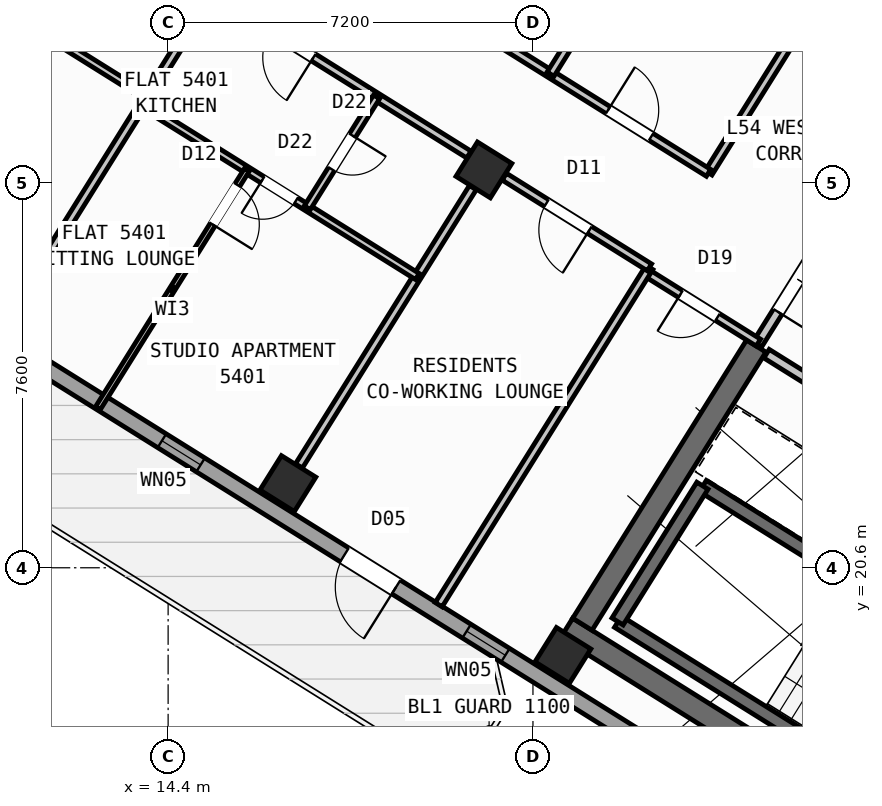
"""IFC4 building model, lengths in metres.
Left out: names, types, materials, properties, quantities, classifications, styles, units other than length and angle.
Written with IfcOpenShell. Run it as: python <this file> out.ifc"""

import sys

from ifc_helpers import new_model, si_unit, direction, frame, frame_2d, origin, origin_2d, place, context, subcontext, project, spatial, rectangle, hollow_rectangle, extrude, source, transform, mapped, element, fill, save


model = new_model("IFC4")
c1 = context("Model", 3, precision=1e-05, world=origin(), true_north=direction((0.0, 1.0)))
c2 = subcontext(c1, "Body", "Model", "MODEL_VIEW")
j1 = project(units=[si_unit("LENGTHUNIT", "METRE"), si_unit("PLANEANGLEUNIT", "RADIAN")], contexts=[c1])
p1 = place(None, origin())
s1 = spatial("IfcSite", under=j1, at=p1, CompositionType="ELEMENT")
p2 = place(p1, origin())
s2 = spatial("IfcBuilding", under=s1, at=p2, CompositionType="ELEMENT")
p3 = place(p2, frame((0.0, 0.0, 214.8)))
s3 = spatial("IfcBuildingStorey", under=s2, at=p3, CompositionType="ELEMENT", Elevation=214.8)
p4 = place(p3, frame((33.324, 12.503, 0.0), z_axis=(0.0, 0.0, 1.0), x_axis=(-0.848043529849, 0.529926571782, 0.0)))
e1 = element("IfcWall", 1, at=p4, inside=s3, PredefinedType="SHEAR", context=c2, shape_type="SweptSolid", body=[
    extrude(rectangle(XDim=13.04, YDim=0.45, at=frame_2d((6.52, 0.0))), origin(), (0.0, 0.0, 1.0), 3.35),
])
p5 = place(p3, frame((26.007, 24.976, 0.0), z_axis=(0.0, 0.0, 1.0), x_axis=(-0.529931155655, -0.848040665456, 0.0)))
e2 = element("IfcWall", 2, at=p5, inside=s3, PredefinedType="SHEAR", context=c2, shape_type="SweptSolid", body=[
    extrude(rectangle(XDim=6.475, YDim=0.45, at=frame_2d((3.238, 0.0))), origin(), (0.0, 0.0, 1.0), 3.35),
])
m1 = source(origin(), c2, "Body", "SweptSolid", [
    extrude(hollow_rectangle(XDim=0.8, YDim=0.8, WallThickness=0.032, at=origin_2d()), origin(), (0.0, 0.0, 1.0), 3.6),
])
for number, where, z_axis, x_axis in (
    (3, (22.191, 18.87, 0.0), (0.0, 0.0, 1.0), (-0.848, 0.53, 0.0)),
    (4, (20.632, 28.452, 0.0), (0.0, 0.0, 1.0), (-0.848, 0.53, 0.0)),
    (5, (16.764, 22.261, 0.0), (0.0, 0.0, 1.0), (-0.848, 0.53, 0.0)),
):
    element("IfcColumn", number, at=place(p3, frame(where, z_axis=z_axis, x_axis=x_axis)), inside=s3, PredefinedType="COLUMN", context=c2, shape_type="MappedRepresentation", body=[
        mapped(m1, transform((0.0, 0.0, 0.0), scale=1.0)),
    ])
p6 = place(p3, frame((31.76, 12.183, 0.0), z_axis=(0.0, 0.0, 1.0), x_axis=(-0.848047074256, 0.529920899612, 0.0)))
e6 = element("IfcWall", 6, at=p6, inside=s3, PredefinedType="STANDARD", context=c2, shape_type="SweptSolid", body=[
    extrude(rectangle(XDim=30.652, YDim=0.32, at=frame_2d((15.326, 0.0))), origin(), (0.0, 0.0, 1.0), 3.35),
])
p7 = place(p6, frame((15.166, 0.0, 0.0)))
e7 = element("IfcOpeningElement", 7, at=p7, cuts=e6, PredefinedType="OPENING", context=c2, shape_type="SweptSolid", body=[
    extrude(rectangle(XDim=1.2, YDim=2.15, at=frame_2d((0.6, 1.075))), frame((0.0, 0.17, 0.0), z_axis=(0.0, -1.0, 0.0), x_axis=(1.0, 0.0, 0.0)), (0.0, 0.0, 1.0), 0.34),
])
p8 = place(p6, frame((2.24, 0.0, 0.9)))
e8 = element("IfcOpeningElement", 8, at=p8, cuts=e6, PredefinedType="OPENING", context=c2, shape_type="SweptSolid", body=[
    extrude(rectangle(XDim=1.65, YDim=1.45, at=frame_2d((0.825, 0.725))), frame((0.0, 0.17, 0.0), z_axis=(0.0, -1.0, 0.0), x_axis=(1.0, 0.0, 0.0)), (0.0, 0.0, 1.0), 0.34),
])
p9 = place(p6, frame((7.469, 0.0, 0.9)))
e9 = element("IfcOpeningElement", 9, at=p9, cuts=e6, PredefinedType="OPENING", context=c2, shape_type="SweptSolid", body=[
    extrude(rectangle(XDim=1.65, YDim=1.45, at=frame_2d((0.825, 0.725))), frame((0.0, 0.17, 0.0), z_axis=(0.0, -1.0, 0.0), x_axis=(1.0, 0.0, 0.0)), (0.0, 0.0, 1.0), 0.34),
])
p10 = place(p6, frame((12.623, 0.0, 1.0)))
e10 = element("IfcOpeningElement", 10, at=p10, cuts=e6, PredefinedType="OPENING", context=c2, shape_type="SweptSolid", body=[
    extrude(rectangle(XDim=0.9, YDim=1.25, at=frame_2d((0.45, 0.625))), frame((0.0, 0.17, 0.0), z_axis=(0.0, -1.0, 0.0), x_axis=(1.0, 0.0, 0.0)), (0.0, 0.0, 1.0), 0.34),
])
p11 = place(p6, frame((19.715, 0.0, 1.0)))
e11 = element("IfcOpeningElement", 11, at=p11, cuts=e6, PredefinedType="OPENING", context=c2, shape_type="SweptSolid", body=[
    extrude(rectangle(XDim=0.9, YDim=1.25, at=frame_2d((0.45, 0.625))), frame((0.0, 0.17, 0.0), z_axis=(0.0, -1.0, 0.0), x_axis=(1.0, 0.0, 0.0)), (0.0, 0.0, 1.0), 0.34),
])
p12 = place(p6, frame((25.566, 0.0, 0.9)))
e12 = element("IfcOpeningElement", 12, at=p12, cuts=e6, PredefinedType="OPENING", context=c2, shape_type="SweptSolid", body=[
    extrude(rectangle(XDim=1.65, YDim=1.45, at=frame_2d((0.825, 0.725))), frame((0.0, 0.17, 0.0), z_axis=(0.0, -1.0, 0.0), x_axis=(1.0, 0.0, 0.0)), (0.0, 0.0, 1.0), 0.34),
])
p13 = place(p6, frame((28.896, 0.0, 1.0)))
e13 = element("IfcOpeningElement", 13, at=p13, cuts=e6, PredefinedType="OPENING", context=c2, shape_type="SweptSolid", body=[
    extrude(rectangle(XDim=0.9, YDim=1.25, at=frame_2d((0.45, 0.625))), frame((0.0, 0.17, 0.0), z_axis=(0.0, -1.0, 0.0), x_axis=(1.0, 0.0, 0.0)), (0.0, 0.0, 1.0), 0.34),
])
p14 = place(p3, frame((5.7, 28.71, 0.0), z_axis=(0.0, 0.0, 1.0), x_axis=(0.529923711467, 0.8480453172, 0.0)))
e14 = element("IfcWall", 14, at=p14, inside=s3, PredefinedType="STANDARD", context=c2, shape_type="SweptSolid", body=[
    extrude(rectangle(XDim=21.587, YDim=0.32, at=frame_2d((10.794, 0.0))), origin(), (0.0, 0.0, 1.0), 2.825),
])
p15 = place(p14, frame((2.184, 0.0, 0.9)))
e15 = element("IfcOpeningElement", 15, at=p15, cuts=e14, PredefinedType="OPENING", context=c2, shape_type="SweptSolid", body=[
    extrude(rectangle(XDim=1.65, YDim=1.45, at=frame_2d((0.825, 0.725))), frame((0.0, 0.17, 0.0), z_axis=(0.0, -1.0, 0.0), x_axis=(1.0, 0.0, 0.0)), (0.0, 0.0, 1.0), 0.34),
])
p16 = place(p14, frame((11.709, 0.0, 0.9)))
e16 = element("IfcOpeningElement", 16, at=p16, cuts=e14, PredefinedType="OPENING", context=c2, shape_type="SweptSolid", body=[
    extrude(rectangle(XDim=1.35, YDim=1.45, at=frame_2d((0.675, 0.725))), frame((0.0, 0.17, 0.0), z_axis=(0.0, -1.0, 0.0), x_axis=(1.0, 0.0, 0.0)), (0.0, 0.0, 1.0), 0.34),
])
p17 = place(p14, frame((17.181, 0.0, 0.95)))
e17 = element("IfcOpeningElement", 17, at=p17, cuts=e14, PredefinedType="OPENING", context=c2, shape_type="SweptSolid", body=[
    extrude(rectangle(XDim=1.95, YDim=1.35, at=frame_2d((0.975, 0.675))), frame((0.0, 0.17, 0.0), z_axis=(0.0, -1.0, 0.0), x_axis=(1.0, 0.0, 0.0)), (0.0, 0.0, 1.0), 0.34),
])
p18 = place(p3, frame((29.605, 15.581, 0.0), z_axis=(0.0, 0.0, 1.0), x_axis=(-0.848036911448, 0.529937163087, 0.0)))
e18 = element("IfcWall", 18, at=p18, inside=s3, PredefinedType="SHEAR", context=c2, shape_type="SweptSolid", body=[
    extrude(rectangle(XDim=7.46, YDim=0.26, at=frame_2d((3.73, 0.0))), origin(), (0.0, 0.0, 1.0), 3.35),
])
p19 = place(p3, frame((31.28, 18.261, 0.0), z_axis=(0.0, 0.0, 1.0), x_axis=(-0.848051618787, 0.529913626805, 0.0)))
e19 = element("IfcWall", 19, at=p19, inside=s3, PredefinedType="SHEAR", context=c2, shape_type="SweptSolid", body=[
    extrude(rectangle(XDim=7.46, YDim=0.26, at=frame_2d((3.73, 0.0))), origin(), (0.0, 0.0, 1.0), 3.35),
])
p20 = place(p19, frame((0.36, 0.0, 0.0)))
e20 = element("IfcOpeningElement", 20, at=p20, cuts=e19, PredefinedType="OPENING", context=c2, shape_type="SweptSolid", body=[
    extrude(rectangle(XDim=0.86, YDim=2.05, at=frame_2d((0.43, 1.025))), frame((0.0, 0.14, 0.0), z_axis=(0.0, -1.0, 0.0), x_axis=(1.0, 0.0, 0.0)), (0.0, 0.0, 1.0), 0.28),
])
p21 = place(p3, frame((24.945, 22.22, 0.0), z_axis=(0.0, 0.0, 1.0), x_axis=(-0.529908658664, -0.84805472316, 0.0)))
e21 = element("IfcWall", 21, at=p21, inside=s3, PredefinedType="SHEAR", context=c2, shape_type="SweptSolid", body=[
    extrude(rectangle(XDim=3.16, YDim=0.26, at=frame_2d((1.58, 0.0))), origin(), (0.0, 0.0, 1.0), 3.35),
])
p22 = place(p3, frame((31.525, 21.504, 0.0), z_axis=(0.0, 0.0, 1.0), x_axis=(-0.848042066329, 0.529928913853, 0.0)))
e22 = element("IfcWall", 22, at=p22, inside=s3, PredefinedType="STANDARD", context=c2, shape_type="SweptSolid", body=[
    extrude(rectangle(XDim=6.268, YDim=0.2, at=frame_2d((3.134, 0.0))), origin(), (0.0, 0.0, 1.0), 3.34),
])
p23 = place(p22, frame((4.4, 0.0, 0.0)))
e23 = element("IfcOpeningElement", 23, at=p23, cuts=e22, PredefinedType="OPENING", context=c2, shape_type="SweptSolid", body=[
    extrude(rectangle(XDim=0.86, YDim=2.05, at=frame_2d((0.43, 1.025))), frame((0.0, 0.11, 0.0), z_axis=(0.0, -1.0, 0.0), x_axis=(1.0, 0.0, 0.0)), (0.0, 0.0, 1.0), 0.22),
])
p24 = place(p22, frame((1.45, 0.0, 0.0)))
e24 = element("IfcOpeningElement", 24, at=p24, cuts=e22, PredefinedType="OPENING", context=c2, shape_type="SweptSolid", body=[
    extrude(rectangle(XDim=0.86, YDim=2.05, at=frame_2d((0.43, 1.025))), frame((0.0, 0.11, 0.0), z_axis=(0.0, -1.0, 0.0), x_axis=(1.0, 0.0, 0.0)), (0.0, 0.0, 1.0), 0.22),
])
p25 = place(p3, frame((27.596, 27.52, 0.0), z_axis=(0.0, 0.0, 1.0), x_axis=(-0.529865479138, -0.848081702443, 0.0)))
e25 = element("IfcWall", 25, at=p25, inside=s3, PredefinedType="STANDARD", context=c2, shape_type="SweptSolid", body=[
    extrude(rectangle(XDim=2.96, YDim=0.2, at=frame_2d((1.48, 0.0))), origin(), (0.0, 0.0, 1.0), 3.34),
])
p26 = place(p25, frame((0.7, 0.0, 0.0)))
e26 = element("IfcOpeningElement", 26, at=p26, cuts=e25, PredefinedType="OPENING", context=c2, shape_type="SweptSolid", body=[
    extrude(rectangle(XDim=1.5, YDim=2.15, at=frame_2d((0.75, 1.075))), frame((0.0, 0.11, 0.0), z_axis=(0.0, -1.0, 0.0), x_axis=(1.0, 0.0, 0.0)), (0.0, 0.0, 1.0), 0.22),
])
p27 = place(p3, frame((26.049, 25.044, 0.0), z_axis=(0.0, 0.0, 1.0), x_axis=(-0.848050851465, 0.529914854792, 0.0)))
e27 = element("IfcWall", 27, at=p27, inside=s3, PredefinedType="PARTITIONING", context=c2, shape_type="SweptSolid", body=[
    extrude(rectangle(XDim=2.61, YDim=0.16, at=frame_2d((1.305, 0.0))), origin(), (0.0, 0.0, 1.0), 2.825),
])
p28 = place(p27, frame((0.95, 0.0, 0.0)))
e28 = element("IfcOpeningElement", 28, at=p28, cuts=e27, PredefinedType="OPENING", context=c2, shape_type="SweptSolid", body=[
    extrude(rectangle(XDim=0.86, YDim=2.05, at=frame_2d((0.43, 1.025))), frame((0.0, 0.09, 0.0), z_axis=(0.0, -1.0, 0.0), x_axis=(1.0, 0.0, 0.0)), (0.0, 0.0, 1.0), 0.18),
])
p29 = place(p3, frame((31.239, 38.274, 0.0), z_axis=(0.0, 0.0, 1.0), x_axis=(-0.529925472745, -0.848044216616, 0.0)))
e29 = element("IfcWall", 29, at=p29, inside=s3, PredefinedType="PARTITIONING", context=c2, shape_type="SweptSolid", body=[
    extrude(rectangle(XDim=11.65, YDim=0.16, at=frame_2d((5.825, 0.0))), origin(), (0.0, 0.0, 1.0), 3.34),
])
p30 = place(p3, frame((23.899, 26.529, 0.0), z_axis=(0.0, 0.0, 1.0), x_axis=(-0.529920662441, -0.848047222457, 0.0)))
e30 = element("IfcWall", 30, at=p30, inside=s3, PredefinedType="PARTITIONING", context=c2, shape_type="SweptSolid", body=[
    extrude(rectangle(XDim=7.85, YDim=0.16, at=frame_2d((3.925, 0.0))), origin(), (0.0, 0.0, 1.0), 3.34),
])
p31 = place(p3, frame((25.065, 28.394, 0.0), z_axis=(0.0, 0.0, 1.0), x_axis=(-0.848048310262, 0.529918921593, 0.0)))
e31 = element("IfcWall", 31, at=p31, inside=s3, PredefinedType="PARTITIONING", context=c2, shape_type="SweptSolid", body=[
    extrude(rectangle(XDim=16.73, YDim=0.16, at=frame_2d((8.365, 0.0))), origin(), (0.0, 0.0, 1.0), 3.34),
])
p32 = place(p31, frame((1.338, 0.0, 0.0)))
e32 = element("IfcOpeningElement", 32, at=p32, cuts=e31, PredefinedType="OPENING", context=c2, shape_type="SweptSolid", body=[
    extrude(rectangle(XDim=1.0, YDim=2.1, at=frame_2d((0.5, 1.05))), frame((0.0, 0.09, 0.0), z_axis=(0.0, -1.0, 0.0), x_axis=(1.0, 0.0, 0.0)), (0.0, 0.0, 1.0), 0.18),
])
p33 = place(p31, frame((5.265, 0.0, 0.0)))
e33 = element("IfcOpeningElement", 33, at=p33, cuts=e31, PredefinedType="OPENING", context=c2, shape_type="SweptSolid", body=[
    extrude(rectangle(XDim=1.0, YDim=2.1, at=frame_2d((0.5, 1.05))), frame((0.0, 0.09, 0.0), z_axis=(0.0, -1.0, 0.0), x_axis=(1.0, 0.0, 0.0)), (0.0, 0.0, 1.0), 0.18),
])
p34 = place(p31, frame((9.526, 0.0, 0.0)))
e34 = element("IfcOpeningElement", 34, at=p34, cuts=e31, PredefinedType="OPENING", context=c2, shape_type="SweptSolid", body=[
    extrude(rectangle(XDim=1.0, YDim=2.1, at=frame_2d((0.5, 1.05))), frame((0.0, 0.09, 0.0), z_axis=(0.0, -1.0, 0.0), x_axis=(1.0, 0.0, 0.0)), (0.0, 0.0, 1.0), 0.18),
])
p35 = place(p31, frame((13.954, 0.0, 0.0)))
e35 = element("IfcOpeningElement", 35, at=p35, cuts=e31, PredefinedType="OPENING", context=c2, shape_type="SweptSolid", body=[
    extrude(rectangle(XDim=1.0, YDim=2.1, at=frame_2d((0.5, 1.05))), frame((0.0, 0.09, 0.0), z_axis=(0.0, -1.0, 0.0), x_axis=(1.0, 0.0, 0.0)), (0.0, 0.0, 1.0), 0.18),
])
p36 = place(p3, frame((23.899, 26.529, 0.0), z_axis=(0.0, 0.0, 1.0), x_axis=(-0.848055143312, 0.529907986259, 0.0)))
e36 = element("IfcWall", 36, at=p36, inside=s3, PredefinedType="PARTITIONING", context=c2, shape_type="SweptSolid", body=[
    extrude(rectangle(XDim=3.378, YDim=0.16, at=frame_2d((1.689, 0.0))), origin(), (0.0, 0.0, 1.0), 2.825),
])
p37 = place(p36, frame((1.395, 0.0, 0.0)))
e37 = element("IfcOpeningElement", 37, at=p37, cuts=e36, PredefinedType="OPENING", context=c2, shape_type="SweptSolid", body=[
    extrude(rectangle(XDim=1.0, YDim=2.1, at=frame_2d((0.5, 1.05))), frame((0.0, 0.09, 0.0), z_axis=(0.0, -1.0, 0.0), x_axis=(1.0, 0.0, 0.0)), (0.0, 0.0, 1.0), 0.18),
])
p38 = place(p3, frame((20.336, 28.755, 0.0), z_axis=(0.0, 0.0, 1.0), x_axis=(-0.848049955116, 0.529916289265, 0.0)))
e38 = element("IfcWall", 38, at=p38, inside=s3, PredefinedType="PARTITIONING", context=c2, shape_type="SweptSolid", body=[
    extrude(rectangle(XDim=5.576, YDim=0.16, at=frame_2d((2.788, 0.0))), origin(), (0.0, 0.0, 1.0), 2.825),
])
p39 = place(p38, frame((3.618, 0.0, 0.0)))
e39 = element("IfcOpeningElement", 39, at=p39, cuts=e38, PredefinedType="OPENING", context=c2, shape_type="SweptSolid", body=[
    extrude(rectangle(XDim=1.0, YDim=2.1, at=frame_2d((0.5, 1.05))), frame((0.0, 0.09, 0.0), z_axis=(0.0, -1.0, 0.0), x_axis=(1.0, 0.0, 0.0)), (0.0, 0.0, 1.0), 0.18),
])
p40 = place(p3, frame((20.414, 28.103, 0.0), z_axis=(0.0, 0.0, 1.0), x_axis=(-0.529934553702, -0.848038542045, 0.0)))
e40 = element("IfcWall", 40, at=p40, inside=s3, PredefinedType="PARTITIONING", context=c2, shape_type="SweptSolid", body=[
    extrude(rectangle(XDim=6.476, YDim=0.16, at=frame_2d((3.238, 0.0))), origin(), (0.0, 0.0, 1.0), 2.825),
])
p41 = place(p3, frame((14.986, 31.494, 0.0), z_axis=(0.0, 0.0, 1.0), x_axis=(-0.529907440938, -0.848055484057, 0.0)))
e41 = element("IfcWall", 41, at=p41, inside=s3, PredefinedType="PARTITIONING", context=c2, shape_type="SweptSolid", body=[
    extrude(rectangle(XDim=6.476, YDim=0.16, at=frame_2d((3.238, 0.0))), origin(), (0.0, 0.0, 1.0), 2.825),
])
p42 = place(p3, frame((19.318, 26.349, 0.0), z_axis=(0.0, 0.0, 1.0), x_axis=(-0.848039019877, 0.529933789039, 0.0)))
e42 = element("IfcWall", 42, at=p42, inside=s3, PredefinedType="PLUMBINGWALL", context=c2, shape_type="SweptSolid", body=[
    extrude(rectangle(XDim=6.4, YDim=0.14, at=frame_2d((3.2, 0.0))), origin(), (0.0, 0.0, 1.0), 3.34),
])
p43 = place(p42, frame((2.824, 0.0, 0.0)))
e43 = element("IfcOpeningElement", 43, at=p43, cuts=e42, PredefinedType="OPENING", context=c2, shape_type="SweptSolid", body=[
    extrude(rectangle(XDim=0.78, YDim=2.05, at=frame_2d((0.39, 1.025))), frame((0.0, 0.08, 0.0), z_axis=(0.0, -1.0, 0.0), x_axis=(1.0, 0.0, 0.0)), (0.0, 0.0, 1.0), 0.16),
])
p44 = place(p3, frame((18.514, 29.894, 0.0), z_axis=(0.0, 0.0, 1.0), x_axis=(-0.529913878929, -0.848051461244, 0.0)))
e44 = element("IfcWall", 44, at=p44, inside=s3, PredefinedType="PLUMBINGWALL", context=c2, shape_type="SweptSolid", body=[
    extrude(rectangle(XDim=2.58, YDim=0.14, at=frame_2d((1.29, 0.0))), origin(), (0.0, 0.0, 1.0), 3.34),
])
p45 = place(p44, frame((0.9, 0.0, 0.0)))
e45 = element("IfcOpeningElement", 45, at=p45, cuts=e44, PredefinedType="OPENING", context=c2, shape_type="SweptSolid", body=[
    extrude(rectangle(XDim=0.78, YDim=2.05, at=frame_2d((0.39, 1.025))), frame((0.0, 0.08, 0.0), z_axis=(0.0, -1.0, 0.0), x_axis=(1.0, 0.0, 0.0)), (0.0, 0.0, 1.0), 0.16),
])
p46 = place(p3, frame((15.953, 28.452, 0.0), z_axis=(0.0, 0.0, 1.0), x_axis=(-0.529919714018, -0.848047815099, 0.0)))
e46 = element("IfcWall", 46, at=p46, inside=s3, PredefinedType="PARTITIONING", context=c2, shape_type="SweptSolid", body=[
    extrude(rectangle(XDim=5.54, YDim=0.11, at=frame_2d((2.77, 0.0))), origin(), (0.0, 0.0, 1.0), 3.34),
])
p47 = place(p46, frame((0.35, 0.0, 0.0)))
e47 = element("IfcOpeningElement", 47, at=p47, cuts=e46, PredefinedType="OPENING", context=c2, shape_type="SweptSolid", body=[
    extrude(rectangle(XDim=0.92, YDim=2.08, at=frame_2d((0.46, 1.04))), frame((0.0, 0.065, 0.0), z_axis=(0.0, -1.0, 0.0), x_axis=(1.0, 0.0, 0.0)), (0.0, 0.0, 1.0), 0.13),
])
p48 = place(p3, frame((12.188, 33.847, 0.0), z_axis=(0.0, 0.0, 1.0), x_axis=(-0.529917860021, -0.848048973604, 0.0)))
e48 = element("IfcWall", 48, at=p48, inside=s3, PredefinedType="PARTITIONING", context=c2, shape_type="SweptSolid", body=[
    extrude(rectangle(XDim=8.12, YDim=0.11, at=frame_2d((4.06, 0.0))), origin(), (0.0, 0.0, 1.0), 3.34),
])
p49 = place(p48, frame((0.76, 0.0, 0.0)))
e49 = element("IfcOpeningElement", 49, at=p49, cuts=e48, PredefinedType="OPENING", context=c2, shape_type="SweptSolid", body=[
    extrude(rectangle(XDim=0.78, YDim=2.05, at=frame_2d((0.39, 1.025))), frame((0.0, 0.065, 0.0), z_axis=(0.0, -1.0, 0.0), x_axis=(1.0, 0.0, 0.0)), (0.0, 0.0, 1.0), 0.13),
])
p50 = place(p48, frame((4.8, 0.0, 0.0)))
e50 = element("IfcOpeningElement", 50, at=p50, cuts=e48, PredefinedType="OPENING", context=c2, shape_type="SweptSolid", body=[
    extrude(rectangle(XDim=0.92, YDim=2.08, at=frame_2d((0.46, 1.04))), frame((0.0, 0.065, 0.0), z_axis=(0.0, -1.0, 0.0), x_axis=(1.0, 0.0, 0.0)), (0.0, 0.0, 1.0), 0.13),
])
p51 = place(p3, frame((13.986, 29.893, 0.0), z_axis=(0.0, 0.0, 1.0), x_axis=(-0.848051346257, 0.52991406295, 0.0)))
e51 = element("IfcWall", 51, at=p51, inside=s3, PredefinedType="PLUMBINGWALL", context=c2, shape_type="SweptSolid", body=[
    extrude(rectangle(XDim=3.62, YDim=0.14, at=frame_2d((1.81, 0.0))), origin(), (0.0, 0.0, 1.0), 3.34),
])
p52 = place(p3, frame((24.379, 34.233, 0.0), z_axis=(0.0, 0.0, 1.0), x_axis=(-0.529922402838, -0.84804613493, 0.0)))
e52 = element("IfcWall", 52, at=p52, inside=s3, PredefinedType="PARTITIONING", context=c2, shape_type="SweptSolid", body=[
    extrude(rectangle(XDim=4.588, YDim=0.16, at=frame_2d((2.294, 0.0))), origin(), (0.0, 0.0, 1.0), 2.825),
])
m2 = source(origin(), c2, "Body", "SweptSolid", [
    extrude(rectangle(XDim=1.2, YDim=2.15, at=frame_2d((0.6, 1.075))), frame((0.0, 0.025, 0.0), z_axis=(0.0, -1.0, 0.0), x_axis=(1.0, 0.0, 0.0)), (0.0, 0.0, 1.0), 0.05),
])
p53 = place(p7, origin())
e53 = element("IfcDoor", 53, at=p53, inside=s3, OperationType="SINGLE_SWING_LEFT", PredefinedType="DOOR", context=c2, shape_type="MappedRepresentation", body=[
    mapped(m2, transform((0.0, 0.0, 0.0), scale=1.0)),
])
fill(e7, e53)
m3 = source(origin(), c2, "Body", "SweptSolid", [
    extrude(rectangle(XDim=0.9, YDim=1.25, at=frame_2d((0.45, 0.625))), frame((0.0, 0.03, 0.0), z_axis=(0.0, -1.0, 0.0), x_axis=(1.0, 0.0, 0.0)), (0.0, 0.0, 1.0), 0.06),
])
p54 = place(p10, origin())
e54 = element("IfcWindow", 54, at=p54, inside=s3, PartitioningType="SINGLE_PANEL", PredefinedType="WINDOW", context=c2, shape_type="MappedRepresentation", body=[
    mapped(m3, transform((0.0, 0.0, 0.0), scale=1.0)),
])
fill(e10, e54)
p55 = place(p11, origin())
e55 = element("IfcWindow", 55, at=p55, inside=s3, PartitioningType="SINGLE_PANEL", PredefinedType="WINDOW", context=c2, shape_type="MappedRepresentation", body=[
    mapped(m3, transform((0.0, 0.0, 0.0), scale=1.0)),
])
fill(e11, e55)
m4 = source(origin(), c2, "Body", "SweptSolid", [
    extrude(rectangle(XDim=0.86, YDim=2.05, at=frame_2d((0.43, 1.025))), frame((0.0, 0.025, 0.0), z_axis=(0.0, -1.0, 0.0), x_axis=(1.0, 0.0, 0.0)), (0.0, 0.0, 1.0), 0.05),
])
p56 = place(p28, origin())
e56 = element("IfcDoor", 56, at=p56, inside=s3, OperationType="SINGLE_SWING_RIGHT", PredefinedType="DOOR", context=c2, shape_type="MappedRepresentation", body=[
    mapped(m4, transform((0.0, 0.0, 0.0), scale=1.0)),
])
fill(e28, e56)
m5 = source(origin(), c2, "Body", "SweptSolid", [
    extrude(rectangle(XDim=1.5, YDim=2.15, at=frame_2d((0.75, 1.075))), frame((0.0, 0.025, 0.0), z_axis=(0.0, -1.0, 0.0), x_axis=(1.0, 0.0, 0.0)), (0.0, 0.0, 1.0), 0.05),
])
p57 = place(p26, origin())
e57 = element("IfcDoor", 57, at=p57, inside=s3, OperationType="DOUBLE_DOOR_SINGLE_SWING", PredefinedType="DOOR", context=c2, shape_type="MappedRepresentation", body=[
    mapped(m5, transform((0.0, 0.0, 0.0), scale=1.0)),
])
fill(e26, e57)
m6 = source(origin(), c2, "Body", "SweptSolid", [
    extrude(rectangle(XDim=1.0, YDim=2.1, at=frame_2d((0.5, 1.05))), frame((0.0, 0.025, 0.0), z_axis=(0.0, -1.0, 0.0), x_axis=(1.0, 0.0, 0.0)), (0.0, 0.0, 1.0), 0.05),
])
p58 = place(p37, origin())
e58 = element("IfcDoor", 58, at=p58, inside=s3, OperationType="SINGLE_SWING_LEFT", PredefinedType="DOOR", context=c2, shape_type="MappedRepresentation", body=[
    mapped(m6, transform((0.0, 0.0, 0.0), scale=1.0)),
])
fill(e37, e58)
m7 = source(origin(), c2, "Body", "SweptSolid", [
    extrude(rectangle(XDim=0.92, YDim=2.08, at=frame_2d((0.46, 1.04))), frame((0.0, 0.025, 0.0), z_axis=(0.0, -1.0, 0.0), x_axis=(1.0, 0.0, 0.0)), (0.0, 0.0, 1.0), 0.05),
])
p59 = place(p47, origin())
e59 = element("IfcDoor", 59, at=p59, inside=s3, OperationType="SINGLE_SWING_RIGHT", PredefinedType="DOOR", context=c2, shape_type="MappedRepresentation", body=[
    mapped(m7, transform((0.0, 0.0, 0.0), scale=1.0)),
])
fill(e47, e59)
p60 = place(p39, origin())
e60 = element("IfcDoor", 60, at=p60, inside=s3, OperationType="SINGLE_SWING_LEFT", PredefinedType="DOOR", context=c2, shape_type="MappedRepresentation", body=[
    mapped(m6, transform((0.0, 0.0, 0.0), scale=1.0)),
])
fill(e39, e60)
m8 = source(origin(), c2, "Body", "SweptSolid", [
    extrude(rectangle(XDim=0.78, YDim=2.05, at=frame_2d((0.39, 1.025))), frame((0.0, 0.025, 0.0), z_axis=(0.0, -1.0, 0.0), x_axis=(1.0, 0.0, 0.0)), (0.0, 0.0, 1.0), 0.05),
])
p61 = place(p43, origin())
e61 = element("IfcDoor", 61, at=p61, inside=s3, OperationType="SINGLE_SWING_RIGHT", PredefinedType="DOOR", context=c2, shape_type="MappedRepresentation", body=[
    mapped(m8, transform((0.0, 0.0, 0.0), scale=1.0)),
])
fill(e43, e61)
p62 = place(p45, origin())
e62 = element("IfcDoor", 62, at=p62, inside=s3, OperationType="SINGLE_SWING_LEFT", PredefinedType="DOOR", context=c2, shape_type="MappedRepresentation", body=[
    mapped(m8, transform((0.0, 0.0, 0.0), scale=1.0)),
])
fill(e45, e62)
p63 = place(p32, frame((1.0, 0.0, 0.0), z_axis=(0.0, 0.0, 1.0), x_axis=(-1.0, 0.0, 0.0)))
e63 = element("IfcDoor", 63, at=p63, inside=s3, OperationType="SINGLE_SWING_LEFT", PredefinedType="DOOR", context=c2, shape_type="MappedRepresentation", body=[
    mapped(m6, transform((0.0, 0.0, 0.0), scale=1.0)),
])
fill(e32, e63)
save(model, sys.argv[1])
